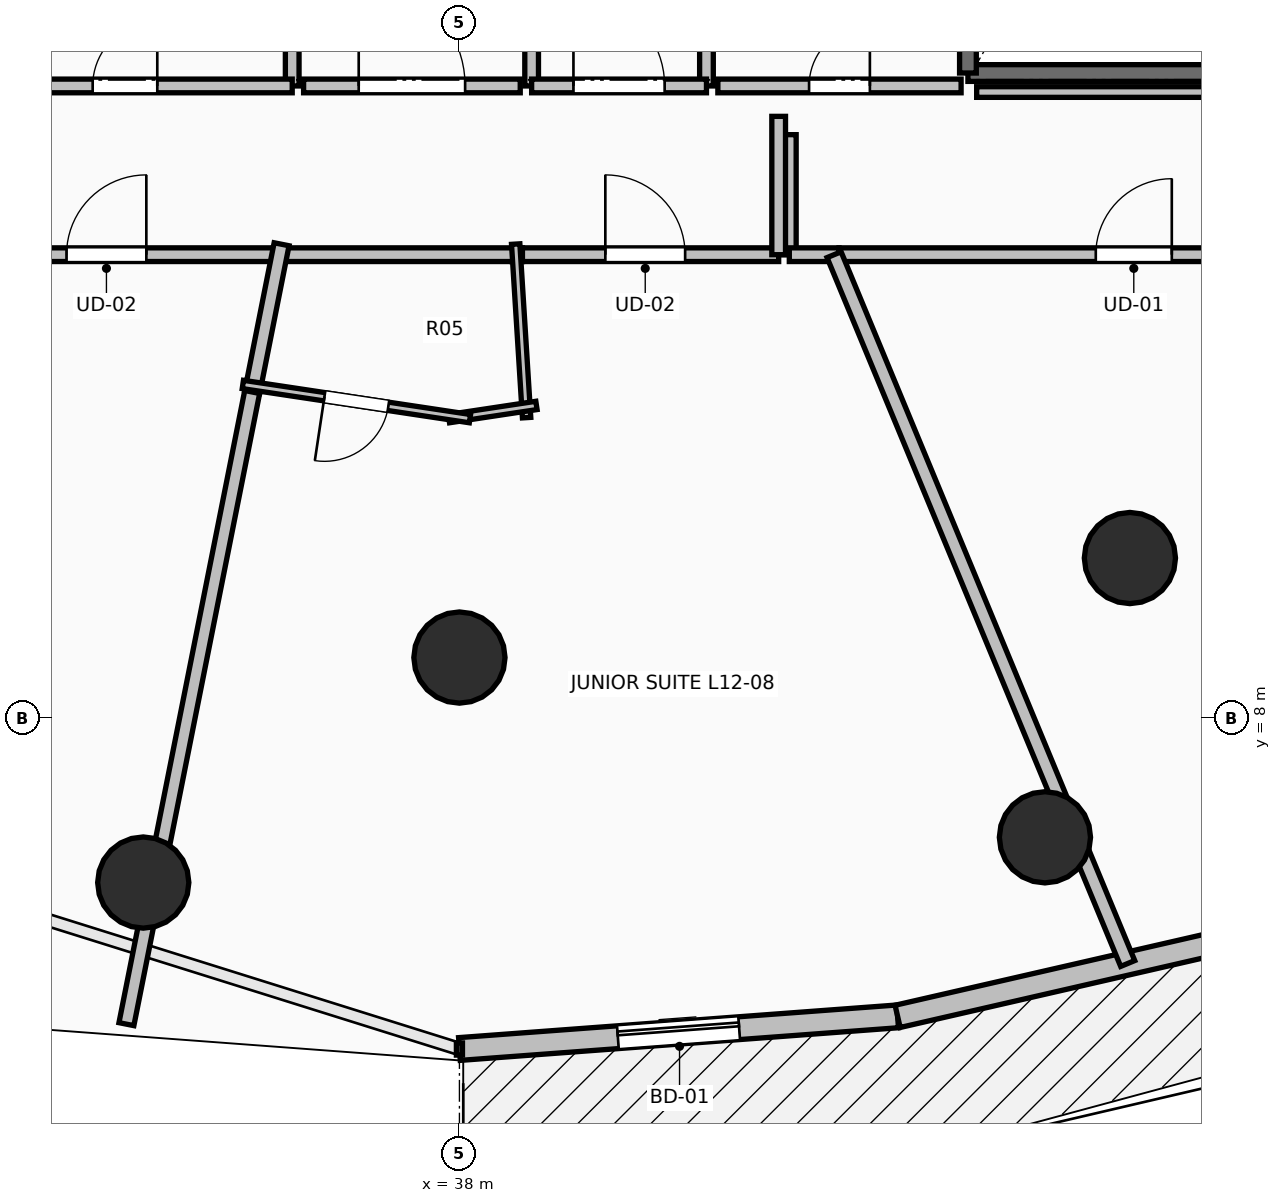
"""IFC4 building model, lengths in metres.
Left out: names, types, materials, properties, quantities, classifications, styles, units other than length and angle.
Written with IfcOpenShell. Run it as: python <this file> out.ifc"""

import sys

from ifc_helpers import new_model, si_unit, direction, frame, frame_2d, origin, origin_2d, place, context, subcontext, project, spatial, rectangle, circle, extrude, element, fill, save


model = new_model("IFC4")
c1 = context("Model", 3, precision=1e-05, world=origin(), true_north=direction((0.0, 1.0)))
c2 = subcontext(c1, "Body", "Model", "MODEL_VIEW")
j1 = project(units=[si_unit("LENGTHUNIT", "METRE"), si_unit("PLANEANGLEUNIT", "RADIAN")], contexts=[c1])
p1 = place(None, origin())
s1 = spatial("IfcSite", under=j1, at=p1, CompositionType="ELEMENT")
p2 = place(p1, origin())
s2 = spatial("IfcBuilding", under=s1, at=p2, CompositionType="ELEMENT")
p3 = place(p2, frame((0.0, 0.0, 48.5)))
s3 = spatial("IfcBuildingStorey", under=s2, at=p3, CompositionType="ELEMENT", Elevation=48.5)
for number, where, z_axis, x_axis in (
    (1, (38.0, 8.8, 0.0), (0.0, 0.0, 1.0), (0.0, -1.0, 0.0)),
    (2, (46.821, 10.109, 0.0), (0.0, 0.0, 1.0), (0.383, -0.924, 0.0)),
    (3, (33.84, 5.84, 0.0), (0.0, 0.0, 1.0), (0.0, -1.0, 0.0)),
    (4, (45.703, 6.435, 0.0), (0.0, 0.0, 1.0), (0.383, -0.924, 0.0)),
):
    element("IfcColumn", number, at=place(p3, frame(where, z_axis=z_axis, x_axis=x_axis)), inside=s3, PredefinedType="COLUMN", context=c2, shape_type="SweptSolid", body=[
        extrude(circle(Radius=0.6, at=origin_2d()), origin(), (0.0, 0.0, 1.0), 3.5),
    ])
p4 = place(p3, frame((38.0, 3.65, 0.0), z_axis=(0.0, 0.0, 1.0), x_axis=(0.99723690101, 0.074287032943, 0.0)))
e5 = element("IfcWall", 5, at=p4, inside=s3, PredefinedType="STANDARD", context=c2, shape_type="SweptSolid", body=[
    extrude(rectangle(XDim=5.781, YDim=0.3, at=frame_2d((2.89, 0.0))), origin(), (0.0, 0.0, 1.0), 3.24),
])
p5 = place(p4, frame((2.09, 0.0, 0.0)))
e6 = element("IfcOpeningElement", 6, at=p5, cuts=e5, PredefinedType="OPENING", context=c2, shape_type="SweptSolid", body=[
    extrude(rectangle(XDim=1.6, YDim=2.3, at=frame_2d((0.8, 1.15))), frame((0.0, 0.165, 0.0), z_axis=(0.0, -1.0, 0.0), x_axis=(1.0, 0.0, 0.0)), (0.0, 0.0, 1.0), 0.33),
])
p6 = place(p3, frame((43.765, 4.079, 0.0), z_axis=(0.0, 0.0, 1.0), x_axis=(0.974671141646, 0.223642942305, 0.0)))
e7 = element("IfcWall", 7, at=p6, inside=s3, PredefinedType="STANDARD", context=c2, shape_type="SweptSolid", body=[
    extrude(rectangle(XDim=5.688, YDim=0.3, at=frame_2d((2.844, 0.0))), origin(), (0.0, 0.0, 1.0), 3.24),
])
p7 = place(p3, frame((48.06, 16.49, 0.0), z_axis=(0.0, 0.0, 1.0), x_axis=(-1.0, 0.0, 0.0)))
e8 = element("IfcWall", 8, at=p7, inside=s3, PredefinedType="SOLIDWALL", context=c2, shape_type="SweptSolid", body=[
    extrude(rectangle(XDim=3.37, YDim=0.22, at=frame_2d((1.685, 0.0))), origin(), (0.0, 0.0, 1.0), 3.24),
])
p8 = place(p3, frame((44.69, 16.49, 0.0), z_axis=(0.0, 0.0, 1.0), x_axis=(0.0, 1.0, 0.0)))
e9 = element("IfcWall", 9, at=p8, inside=s3, PredefinedType="SOLIDWALL", context=c2, shape_type="SweptSolid", body=[
    extrude(rectangle(XDim=7.42, YDim=0.22, at=frame_2d((3.71, 0.0))), origin(), (0.0, 0.0, 1.0), 3.24),
])
p9 = place(p3, frame((41.25, 16.32, 0.0), z_axis=(0.0, 0.0, 1.0), x_axis=(0.0, 1.0, 0.0)))
e10 = element("IfcWall", 10, at=p9, inside=s3, PredefinedType="PARTITIONING", context=c2, shape_type="SweptSolid", body=[
    extrude(rectangle(XDim=3.985, YDim=0.18, at=frame_2d((1.992, 0.0))), origin(), (0.0, 0.0, 1.0), 3.24),
])
p10 = place(p9, frame((1.593, 0.0, 0.0)))
e11 = element("IfcOpeningElement", 11, at=p10, cuts=e10, PredefinedType="OPENING", context=c2, shape_type="SweptSolid", body=[
    extrude(rectangle(XDim=0.8, YDim=2.05, at=frame_2d((0.4, 1.025))), frame((0.0, 0.105, 0.0), z_axis=(0.0, -1.0, 0.0), x_axis=(1.0, 0.0, 0.0)), (0.0, 0.0, 1.0), 0.21),
])
p11 = place(p3, frame((38.95, 21.755, 0.0), z_axis=(0.0, 0.0, 1.0), x_axis=(0.0, -1.0, 0.0)))
e12 = element("IfcWall", 12, at=p11, inside=s3, PredefinedType="PARTITIONING", context=c2, shape_type="SweptSolid", body=[
    extrude(rectangle(XDim=5.435, YDim=0.18, at=frame_2d((2.717, 0.0))), origin(), (0.0, 0.0, 1.0), 3.24),
])
p12 = place(p11, frame((2.018, 0.0, 0.0)))
e13 = element("IfcOpeningElement", 13, at=p12, cuts=e12, PredefinedType="OPENING", context=c2, shape_type="SweptSolid", body=[
    extrude(rectangle(XDim=1.4, YDim=2.2, at=frame_2d((0.7, 1.1))), frame((0.0, 0.105, 0.0), z_axis=(0.0, -1.0, 0.0), x_axis=(1.0, 0.0, 0.0)), (0.0, 0.0, 1.0), 0.21),
])
p13 = place(p3, frame((38.95, 16.32, 0.0), z_axis=(0.0, 0.0, 1.0), x_axis=(1.0, 0.0, 0.0)))
e14 = element("IfcWall", 14, at=p13, inside=s3, PredefinedType="PARTITIONING", context=c2, shape_type="SweptSolid", body=[
    extrude(rectangle(XDim=2.3, YDim=0.18, at=frame_2d((1.15, 0.0))), origin(), (0.0, 0.0, 1.0), 3.24),
])
p14 = place(p13, frame((0.55, 0.0, 0.0)))
e15 = element("IfcOpeningElement", 15, at=p14, cuts=e14, PredefinedType="OPENING", context=c2, shape_type="SweptSolid", body=[
    extrude(rectangle(XDim=1.2, YDim=2.15, at=frame_2d((0.6, 1.075))), frame((0.0, 0.105, 0.0), z_axis=(0.0, -1.0, 0.0), x_axis=(1.0, 0.0, 0.0)), (0.0, 0.0, 1.0), 0.21),
])
p15 = place(p3, frame((41.4, 16.32, 0.0), z_axis=(0.0, 0.0, 1.0), x_axis=(1.0, 0.0, 0.0)))
e16 = element("IfcWall", 16, at=p15, inside=s3, PredefinedType="PARTITIONING", context=c2, shape_type="SweptSolid", body=[
    extrude(rectangle(XDim=3.2, YDim=0.18, at=frame_2d((1.6, 0.0))), origin(), (0.0, 0.0, 1.0), 3.24),
])
p16 = place(p15, frame((1.2, 0.0, 0.0)))
e17 = element("IfcOpeningElement", 17, at=p16, cuts=e16, PredefinedType="OPENING", context=c2, shape_type="SweptSolid", body=[
    extrude(rectangle(XDim=0.8, YDim=2.05, at=frame_2d((0.4, 1.025))), frame((0.0, 0.105, 0.0), z_axis=(0.0, -1.0, 0.0), x_axis=(1.0, 0.0, 0.0)), (0.0, 0.0, 1.0), 0.21),
])
p17 = place(p3, frame((35.8, 16.32, 0.0), z_axis=(0.0, 0.0, 1.0), x_axis=(0.0, 1.0, 0.0)))
e18 = element("IfcWall", 18, at=p17, inside=s3, PredefinedType="PARTITIONING", context=c2, shape_type="SweptSolid", body=[
    extrude(rectangle(XDim=5.13, YDim=0.18, at=frame_2d((2.565, 0.0))), origin(), (0.0, 0.0, 1.0), 3.24),
])
p18 = place(p3, frame((31.4, 16.32, 0.0), z_axis=(0.0, 0.0, 1.0), x_axis=(1.0, 0.0, 0.0)))
e19 = element("IfcWall", 19, at=p18, inside=s3, PredefinedType="PARTITIONING", context=c2, shape_type="SweptSolid", body=[
    extrude(rectangle(XDim=4.4, YDim=0.18, at=frame_2d((2.2, 0.0))), origin(), (0.0, 0.0, 1.0), 3.24),
])
p19 = place(p18, frame((1.775, 0.0, 0.0)))
e20 = element("IfcOpeningElement", 20, at=p19, cuts=e19, PredefinedType="OPENING", context=c2, shape_type="SweptSolid", body=[
    extrude(rectangle(XDim=0.85, YDim=2.1, at=frame_2d((0.425, 1.05))), frame((0.0, 0.105, 0.0), z_axis=(0.0, -1.0, 0.0), x_axis=(1.0, 0.0, 0.0)), (0.0, 0.0, 1.0), 0.21),
])
p20 = place(p3, frame((35.95, 16.32, 0.0), z_axis=(0.0, 0.0, 1.0), x_axis=(1.0, 0.0, 0.0)))
e21 = element("IfcWall", 21, at=p20, inside=s3, PredefinedType="PARTITIONING", context=c2, shape_type="SweptSolid", body=[
    extrude(rectangle(XDim=2.85, YDim=0.18, at=frame_2d((1.425, 0.0))), origin(), (0.0, 0.0, 1.0), 3.24),
])
p21 = place(p20, frame((0.725, 0.0, 0.0)))
e22 = element("IfcOpeningElement", 22, at=p21, cuts=e21, PredefinedType="OPENING", context=c2, shape_type="SweptSolid", body=[
    extrude(rectangle(XDim=1.4, YDim=2.2, at=frame_2d((0.7, 1.1))), frame((0.0, 0.105, 0.0), z_axis=(0.0, -1.0, 0.0), x_axis=(1.0, 0.0, 0.0)), (0.0, 0.0, 1.0), 0.21),
])
p22 = place(p3, frame((31.019, 14.1, 0.0), z_axis=(0.0, 0.0, 1.0), x_axis=(1.0, 0.0, 0.0)))
e23 = element("IfcWall", 23, at=p22, inside=s3, PredefinedType="PARTITIONING", context=c2, shape_type="SweptSolid", body=[
    extrude(rectangle(XDim=4.674, YDim=0.18, at=frame_2d((2.337, 0.0))), origin(), (0.0, 0.0, 1.0), 3.24),
])
p23 = place(p22, frame((1.812, 0.0, 0.0)))
e24 = element("IfcOpeningElement", 24, at=p23, cuts=e23, PredefinedType="OPENING", context=c2, shape_type="SweptSolid", body=[
    extrude(rectangle(XDim=1.05, YDim=2.2, at=frame_2d((0.525, 1.1))), frame((0.0, 0.105, 0.0), z_axis=(0.0, -1.0, 0.0), x_axis=(1.0, 0.0, 0.0)), (0.0, 0.0, 1.0), 0.21),
])
p24 = place(p3, frame((42.34, 15.679, 0.0), z_axis=(0.0, 0.0, 1.0), x_axis=(0.0, -1.0, 0.0)))
e25 = element("IfcWall", 25, at=p24, inside=s3, PredefinedType="PARTITIONING", context=c2, shape_type="SweptSolid", body=[
    extrude(rectangle(XDim=1.579, YDim=0.18, at=frame_2d((0.79, 0.0))), origin(), (0.0, 0.0, 1.0), 3.24),
])
p25 = place(p3, frame((42.34, 14.1, 0.0), z_axis=(0.0, 0.0, 1.0), x_axis=(1.0, 0.0, 0.0)))
e26 = element("IfcWall", 26, at=p25, inside=s3, PredefinedType="PARTITIONING", context=c2, shape_type="SweptSolid", body=[
    extrude(rectangle(XDim=0.654, YDim=0.18, at=frame_2d((0.327, 0.0))), origin(), (0.0, 0.0, 1.0), 3.24),
])
p26 = place(p3, frame((38.689, 14.1, 0.0), z_axis=(0.0, 0.0, 1.0), x_axis=(1.0, 0.0, 0.0)))
e27 = element("IfcWall", 27, at=p26, inside=s3, PredefinedType="PARTITIONING", context=c2, shape_type="SweptSolid", body=[
    extrude(rectangle(XDim=3.511, YDim=0.18, at=frame_2d((1.755, 0.0))), origin(), (0.0, 0.0, 1.0), 3.24),
])
p27 = place(p26, frame((1.23, 0.0, 0.0)))
e28 = element("IfcOpeningElement", 28, at=p27, cuts=e27, PredefinedType="OPENING", context=c2, shape_type="SweptSolid", body=[
    extrude(rectangle(XDim=1.05, YDim=2.2, at=frame_2d((0.525, 1.1))), frame((0.0, 0.105, 0.0), z_axis=(0.0, -1.0, 0.0), x_axis=(1.0, 0.0, 0.0)), (0.0, 0.0, 1.0), 0.21),
])
p28 = place(p3, frame((42.2, 14.1, 0.0), z_axis=(0.0, 0.0, 1.0), x_axis=(0.0, 1.0, 0.0)))
e29 = element("IfcWall", 29, at=p28, inside=s3, PredefinedType="PARTITIONING", context=c2, shape_type="SweptSolid", body=[
    extrude(rectangle(XDim=1.82, YDim=0.18, at=frame_2d((0.91, 0.0))), origin(), (0.0, 0.0, 1.0), 3.24),
])
p29 = place(p3, frame((35.553, 14.1, 0.0), z_axis=(0.0, 0.0, 1.0), x_axis=(1.0, 0.0, 0.0)))
e30 = element("IfcWall", 30, at=p29, inside=s3, PredefinedType="PARTITIONING", context=c2, shape_type="SweptSolid", body=[
    extrude(rectangle(XDim=3.276, YDim=0.18, at=frame_2d((1.638, 0.0))), origin(), (0.0, 0.0, 1.0), 3.24),
])
p30 = place(p3, frame((42.994, 14.1, 0.0), z_axis=(0.0, 0.0, 1.0), x_axis=(1.0, 0.0, 0.0)))
e31 = element("IfcWall", 31, at=p30, inside=s3, PredefinedType="PARTITIONING", context=c2, shape_type="SweptSolid", body=[
    extrude(rectangle(XDim=7.756, YDim=0.18, at=frame_2d((3.878, 0.0))), origin(), (0.0, 0.0, 1.0), 2.432),
])
p31 = place(p30, frame((3.378, 0.0, 0.0)))
e32 = element("IfcOpeningElement", 32, at=p31, cuts=e31, PredefinedType="OPENING", context=c2, shape_type="SweptSolid", body=[
    extrude(rectangle(XDim=1.0, YDim=2.15, at=frame_2d((0.5, 1.075))), frame((0.0, 0.105, 0.0), z_axis=(0.0, -1.0, 0.0), x_axis=(1.0, 0.0, 0.0)), (0.0, 0.0, 1.0), 0.21),
])
p32 = place(p3, frame((33.619, 3.977, 0.0), z_axis=(0.0, 0.0, 1.0), x_axis=(0.195151937053, 0.980773022398, 0.0)))
e33 = element("IfcWall", 33, at=p32, inside=s3, PredefinedType="PARTITIONING", context=c2, shape_type="SweptSolid", body=[
    extrude(rectangle(XDim=8.62, YDim=0.2, at=frame_2d((4.31, 0.0))), origin(), (0.0, 0.0, 1.0), 2.432),
])
p33 = place(p3, frame((35.274, 12.294, 0.0), z_axis=(0.0, 0.0, 1.0), x_axis=(0.194907646023, 0.980821599233, 0.0)))
e34 = element("IfcWall", 34, at=p33, inside=s3, PredefinedType="PARTITIONING", context=c2, shape_type="SweptSolid", body=[
    extrude(rectangle(XDim=1.982, YDim=0.2, at=frame_2d((0.991, 0.0))), origin(), (0.0, 0.0, 1.0), 2.886),
])
p34 = place(p3, frame((38.74, 14.24, 0.0), z_axis=(0.0, 0.0, 1.0), x_axis=(0.062743659702, -0.998029675494, 0.0)))
e35 = element("IfcWall", 35, at=p34, inside=s3, PredefinedType="PARTITIONING", context=c2, shape_type="SweptSolid", body=[
    extrude(rectangle(XDim=2.288, YDim=0.11, at=frame_2d((1.144, 0.0))), origin(), (0.0, 0.0, 1.0), 2.886),
])
p35 = place(p3, frame((39.013, 12.117, 0.0), z_axis=(0.0, 0.0, 1.0), x_axis=(-0.988803754909, -0.14922176208, 0.0)))
e36 = element("IfcWall", 36, at=p35, inside=s3, PredefinedType="PARTITIONING", context=c2, shape_type="SweptSolid", body=[
    extrude(rectangle(XDim=1.165, YDim=0.11, at=frame_2d((0.583, 0.0))), origin(), (0.0, 0.0, 1.0), 3.24),
])
p36 = place(p3, frame((38.138, 11.943, 0.0), z_axis=(0.0, 0.0, 1.0), x_axis=(-0.988861549405, 0.148838288446, 0.0)))
e37 = element("IfcWall", 37, at=p36, inside=s3, PredefinedType="PARTITIONING", context=c2, shape_type="SweptSolid", body=[
    extrude(rectangle(XDim=3.021, YDim=0.11, at=frame_2d((1.511, 0.0))), origin(), (0.0, 0.0, 1.0), 3.24),
])
p37 = place(p36, frame((1.086, 0.0, 0.0)))
e38 = element("IfcOpeningElement", 38, at=p37, cuts=e37, PredefinedType="OPENING", context=c2, shape_type="SweptSolid", body=[
    extrude(rectangle(XDim=0.85, YDim=2.1, at=frame_2d((0.425, 1.05))), frame((0.0, 0.07, 0.0), z_axis=(0.0, -1.0, 0.0), x_axis=(1.0, 0.0, 0.0)), (0.0, 0.0, 1.0), 0.14),
])
p38 = place(p3, frame((46.792, 4.775, 0.0), z_axis=(0.0, 0.0, 1.0), x_axis=(-0.382718503749, 0.923865004689, 0.0)))
e39 = element("IfcWall", 39, at=p38, inside=s3, PredefinedType="PARTITIONING", context=c2, shape_type="SweptSolid", body=[
    extrude(rectangle(XDim=10.094, YDim=0.2, at=frame_2d((5.047, 0.0))), origin(), (0.0, 0.0, 1.0), 2.432),
])
p39 = place(p3, frame((48.55, 16.24, 0.0), z_axis=(0.0, 0.0, 1.0), x_axis=(-1.0, 0.0, 0.0)))
e40 = element("IfcWall", 40, at=p39, inside=s3, PredefinedType="PARTITIONING", context=c2, shape_type="SweptSolid", body=[
    extrude(rectangle(XDim=3.745, YDim=0.14, at=frame_2d((1.873, 0.0))), origin(), (0.0, 0.0, 1.0), 2.432),
])
p40 = place(p5, origin())
e41 = element("IfcDoor", 41, at=p40, inside=s3, OperationType="SLIDING_TO_LEFT", PredefinedType="DOOR", context=c2, shape_type="SweptSolid", body=[
    extrude(rectangle(XDim=1.6, YDim=2.3, at=frame_2d((0.8, 1.15))), frame((0.0, 0.025, 0.0), z_axis=(0.0, -1.0, 0.0), x_axis=(1.0, 0.0, 0.0)), (0.0, 0.0, 1.0), 0.05),
])
fill(e6, e41)
p41 = place(p14, origin())
e42 = element("IfcDoor", 42, at=p41, inside=s3, OperationType="SINGLE_SWING_LEFT", PredefinedType="DOOR", context=c2, shape_type="SweptSolid", body=[
    extrude(rectangle(XDim=1.2, YDim=2.15, at=frame_2d((0.6, 1.075))), frame((0.0, 0.025, 0.0), z_axis=(0.0, -1.0, 0.0), x_axis=(1.0, 0.0, 0.0)), (0.0, 0.0, 1.0), 0.05),
])
fill(e15, e42)
p42 = place(p16, origin())
e43 = element("IfcDoor", 43, at=p42, inside=s3, OperationType="SINGLE_SWING_RIGHT", PredefinedType="DOOR", context=c2, shape_type="SweptSolid", body=[
    extrude(rectangle(XDim=0.8, YDim=2.05, at=frame_2d((0.4, 1.025))), frame((0.0, 0.025, 0.0), z_axis=(0.0, -1.0, 0.0), x_axis=(1.0, 0.0, 0.0)), (0.0, 0.0, 1.0), 0.05),
])
fill(e17, e43)
p43 = place(p19, origin())
e44 = element("IfcDoor", 44, at=p43, inside=s3, OperationType="SINGLE_SWING_RIGHT", PredefinedType="DOOR", context=c2, shape_type="SweptSolid", body=[
    extrude(rectangle(XDim=0.85, YDim=2.1, at=frame_2d((0.425, 1.05))), frame((0.0, 0.025, 0.0), z_axis=(0.0, -1.0, 0.0), x_axis=(1.0, 0.0, 0.0)), (0.0, 0.0, 1.0), 0.05),
])
fill(e20, e44)
p44 = place(p21, origin())
e45 = element("IfcDoor", 45, at=p44, inside=s3, OperationType="DOUBLE_SWING_LEFT", PredefinedType="DOOR", context=c2, shape_type="SweptSolid", body=[
    extrude(rectangle(XDim=1.4, YDim=2.2, at=frame_2d((0.7, 1.1))), frame((0.0, 0.025, 0.0), z_axis=(0.0, -1.0, 0.0), x_axis=(1.0, 0.0, 0.0)), (0.0, 0.0, 1.0), 0.05),
])
fill(e22, e45)
p45 = place(p23, origin())
e46 = element("IfcDoor", 46, at=p45, inside=s3, OperationType="SINGLE_SWING_RIGHT", PredefinedType="DOOR", context=c2, shape_type="SweptSolid", body=[
    extrude(rectangle(XDim=1.05, YDim=2.2, at=frame_2d((0.525, 1.1))), frame((0.0, 0.025, 0.0), z_axis=(0.0, -1.0, 0.0), x_axis=(1.0, 0.0, 0.0)), (0.0, 0.0, 1.0), 0.05),
])
fill(e24, e46)
p46 = place(p27, origin())
e47 = element("IfcDoor", 47, at=p46, inside=s3, OperationType="SINGLE_SWING_LEFT", PredefinedType="DOOR", context=c2, shape_type="SweptSolid", body=[
    extrude(rectangle(XDim=1.05, YDim=2.2, at=frame_2d((0.525, 1.1))), frame((0.0, 0.025, 0.0), z_axis=(0.0, -1.0, 0.0), x_axis=(1.0, 0.0, 0.0)), (0.0, 0.0, 1.0), 0.05),
])
fill(e28, e47)
p47 = place(p31, origin())
e48 = element("IfcDoor", 48, at=p47, inside=s3, OperationType="SINGLE_SWING_RIGHT", PredefinedType="DOOR", context=c2, shape_type="SweptSolid", body=[
    extrude(rectangle(XDim=1.0, YDim=2.15, at=frame_2d((0.5, 1.075))), frame((0.0, 0.025, 0.0), z_axis=(0.0, -1.0, 0.0), x_axis=(1.0, 0.0, 0.0)), (0.0, 0.0, 1.0), 0.05),
])
fill(e32, e48)
p48 = place(p37, origin())
e49 = element("IfcDoor", 49, at=p48, inside=s3, OperationType="SINGLE_SWING_RIGHT", PredefinedType="DOOR", context=c2, shape_type="SweptSolid", body=[
    extrude(rectangle(XDim=0.85, YDim=2.1, at=frame_2d((0.425, 1.05))), frame((0.0, 0.025, 0.0), z_axis=(0.0, -1.0, 0.0), x_axis=(1.0, 0.0, 0.0)), (0.0, 0.0, 1.0), 0.05),
])
fill(e38, e49)
save(model, sys.argv[1])
